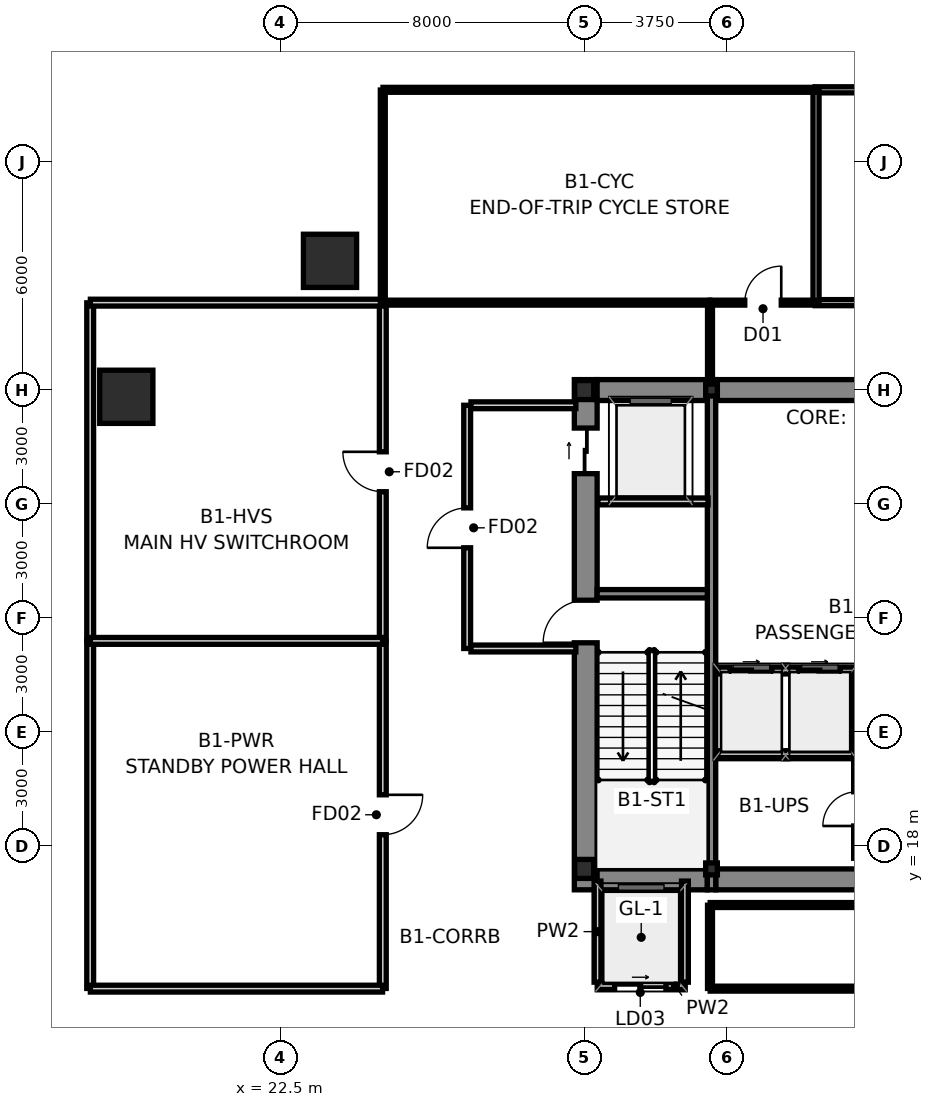
"""IFC4 building model, lengths in metres.
Left out: names, types, materials, properties, quantities, classifications, styles, units other than length and angle.
Written with IfcOpenShell. Run it as: python <this file> out.ifc"""

import sys

from ifc_helpers import new_model, si_unit, direction, frame, frame_2d, origin, origin_2d, place, context, subcontext, project, spatial, rectangle, hollow_rectangle, i_section, extrude, source, transform, mapped, element, fill, save


model = new_model("IFC4")
c1 = context("Model", 3, precision=1e-05, world=origin(), true_north=direction((0.0, 1.0)))
c2 = subcontext(c1, "Body", "Model", "MODEL_VIEW")
j1 = project(units=[si_unit("LENGTHUNIT", "METRE"), si_unit("PLANEANGLEUNIT", "RADIAN")], contexts=[c1])
p1 = place(None, origin())
s1 = spatial("IfcSite", under=j1, at=p1, CompositionType="ELEMENT")
p2 = place(p1, origin())
s2 = spatial("IfcBuilding", under=s1, at=p2, CompositionType="ELEMENT")
p3 = place(p2, frame((0.0, 0.0, -4.8)))
s3 = spatial("IfcBuildingStorey", under=s2, at=p3, CompositionType="ELEMENT", Elevation=-4.8)
m1 = source(origin(), c2, "Body", "SweptSolid", [
    extrude(i_section(OverallWidth=0.5, OverallDepth=0.5, WebThickness=0.028, FlangeThickness=0.04, at=origin_2d()), origin(), (0.0, 0.0, 1.0), 4.8),
])
for number, where, z_axis, x_axis in (
    (1, (30.5, 17.4, 0.0), (0.0, 0.0, 1.0), (1.0, 0.0, 0.0)),
    (2, (30.5, 30.0, 0.0), (0.0, 0.0, 1.0), (1.0, 0.0, 0.0)),
):
    element("IfcColumn", number, at=place(p3, frame(where, z_axis=z_axis, x_axis=x_axis)), inside=s3, PredefinedType="COLUMN", context=c2, shape_type="MappedRepresentation", body=[
        mapped(m1, transform((0.0, 0.0, 0.0), scale=1.0)),
    ])
m2 = source(origin(), c2, "Body", "SweptSolid", [
    extrude(i_section(OverallWidth=0.307, OverallDepth=0.315, WebThickness=0.012, FlangeThickness=0.019, at=origin_2d()), origin(), (0.0, 0.0, 1.0), 4.8),
])
for number, where, z_axis, x_axis in (
    (3, (33.85, 17.4, 0.0), (0.0, 0.0, 1.0), (1.0, 0.0, 0.0)),
    (4, (33.85, 30.0, 0.0), (0.0, 0.0, 1.0), (1.0, 0.0, 0.0)),
):
    element("IfcColumn", number, at=place(p3, frame(where, z_axis=z_axis, x_axis=x_axis)), inside=s3, PredefinedType="COLUMN", context=c2, shape_type="MappedRepresentation", body=[
        mapped(m2, transform((0.0, 0.0, 0.0), scale=1.0)),
    ])
p4 = place(p3, frame((30.54, 16.85, 0.0), z_axis=(0.0, 0.0, 1.0), x_axis=(0.0, 1.0, 0.0)))
e5 = element("IfcWall", 5, at=p4, inside=s3, PredefinedType="SHEAR", context=c2, shape_type="SweptSolid", body=[
    extrude(rectangle(XDim=13.425, YDim=0.6, at=frame_2d((6.712, 0.0))), origin(), (0.0, 0.0, 1.0), 4.8),
])
p5 = place(p4, frame((6.5, 0.0, 0.0)))
e6 = element("IfcOpeningElement", 6, at=p5, cuts=e5, PredefinedType="OPENING", context=c2, shape_type="SweptSolid", body=[
    extrude(rectangle(XDim=1.12, YDim=2.15, at=frame_2d((0.56, 1.075))), frame((0.0, 0.312, 0.0), z_axis=(0.0, -1.0, 0.0), x_axis=(1.0, 0.0, 0.0)), (0.0, 0.0, 1.0), 0.624),
])
p6 = place(p4, frame((10.95, 0.0, 0.0)))
e7 = element("IfcOpeningElement", 7, at=p6, cuts=e5, PredefinedType="OPENING", context=c2, shape_type="SweptSolid", body=[
    extrude(rectangle(XDim=1.2, YDim=2.2, at=frame_2d((0.6, 1.1))), frame((0.0, 0.312, 0.0), z_axis=(0.0, -1.0, 0.0), x_axis=(1.0, 0.0, 0.0)), (0.0, 0.0, 1.0), 0.624),
])
p7 = place(p3, frame((30.84, 17.125, 0.0), z_axis=(0.0, 0.0, 1.0), x_axis=(1.0, 0.0, 0.0)))
e8 = element("IfcWall", 8, at=p7, inside=s3, PredefinedType="SHEAR", context=c2, shape_type="SweptSolid", body=[
    extrude(rectangle(XDim=2.9, YDim=0.55, at=frame_2d((1.45, 0.0))), origin(), (0.0, 0.0, 1.0), 4.8),
])
p8 = place(p3, frame((33.96, 17.125, 0.0), z_axis=(0.0, 0.0, 1.0), x_axis=(1.0, 0.0, 0.0)))
e9 = element("IfcWall", 9, at=p8, inside=s3, PredefinedType="SHEAR", context=c2, shape_type="SweptSolid", body=[
    extrude(rectangle(XDim=8.08, YDim=0.55, at=frame_2d((4.04, 0.0))), origin(), (0.0, 0.0, 1.0), 4.8),
])
p9 = place(p3, frame((30.84, 30.0, 0.0), z_axis=(0.0, 0.0, 1.0), x_axis=(1.0, 0.0, 0.0)))
e10 = element("IfcWall", 10, at=p9, inside=s3, PredefinedType="SHEAR", context=c2, shape_type="SweptSolid", body=[
    extrude(rectangle(XDim=2.9, YDim=0.55, at=frame_2d((1.45, 0.0))), origin(), (0.0, 0.0, 1.0), 4.8),
])
p10 = place(p3, frame((33.96, 30.0, 0.0), z_axis=(0.0, 0.0, 1.0), x_axis=(1.0, 0.0, 0.0)))
e11 = element("IfcWall", 11, at=p10, inside=s3, PredefinedType="SHEAR", context=c2, shape_type="SweptSolid", body=[
    extrude(rectangle(XDim=3.78, YDim=0.55, at=frame_2d((1.89, 0.0))), origin(), (0.0, 0.0, 1.0), 4.8),
])
p11 = place(p3, frame((33.85, 16.85, 0.0), z_axis=(0.0, 0.0, 1.0), x_axis=(0.0, 1.0, 0.0)))
e12 = element("IfcWall", 12, at=p11, inside=s3, PredefinedType="SHEAR", context=c2, shape_type="SweptSolid", body=[
    extrude(rectangle(XDim=13.425, YDim=0.22, at=frame_2d((6.712, 0.0))), origin(), (0.0, 0.0, 1.0), 4.8),
])
p12 = place(p3, frame((30.84, 24.64, 0.0), z_axis=(0.0, 0.0, 1.0), x_axis=(1.0, 0.0, 0.0)))
e13 = element("IfcWall", 13, at=p12, inside=s3, PredefinedType="SHEAR", context=c2, shape_type="SweptSolid", body=[
    extrude(rectangle(XDim=2.9, YDim=0.22, at=frame_2d((1.45, 0.0))), origin(), (0.0, 0.0, 1.0), 4.8),
])
m3 = source(origin(), c2, "Body", "SweptSolid", [
    extrude(hollow_rectangle(XDim=1.4, YDim=1.4, WallThickness=0.08, at=origin_2d()), origin(), (0.0, 0.0, 1.0), 4.801),
])
p13 = place(p3, frame((18.451, 29.823, 0.0), z_axis=(0.014899529501, -0.013780793498, 0.999794025663), x_axis=(0.679008224545, 0.734130663438, 0.0)))
e14 = element("IfcColumn", 14, at=p13, inside=s3, PredefinedType="COLUMN", context=c2, shape_type="MappedRepresentation", body=[
    mapped(m3, transform((0.0, 0.0, 0.0), scale=1.0)),
])
m4 = source(origin(), c2, "Body", "SweptSolid", [
    extrude(hollow_rectangle(XDim=1.4, YDim=1.4, WallThickness=0.08, at=origin_2d()), origin(), (0.0, 0.0, 1.0), 4.8),
])
p14 = place(p3, frame((23.811, 33.4, 0.0), z_axis=(0.0, 0.0, 1.0), x_axis=(1.0, 0.0, 0.0)))
e15 = element("IfcColumn", 15, at=p14, inside=s3, PredefinedType="COLUMN", context=c2, shape_type="MappedRepresentation", body=[
    mapped(m4, transform((0.0, 0.0, 0.0), scale=1.0)),
])
p15 = place(p3, frame((30.85, 14.32, 0.0), z_axis=(0.0, 0.0, 1.0), x_axis=(1.0, 0.0, 0.0)))
e16 = element("IfcWall", 16, at=p15, inside=s3, PredefinedType="PARTITIONING", context=c2, shape_type="SweptSolid", body=[
    extrude(rectangle(XDim=2.3, YDim=0.18, at=frame_2d((1.15, 0.0))), origin(), (0.0, 0.0, 1.0), 4.48),
])
p16 = place(p15, frame((0.45, 0.0, 0.0)))
e17 = element("IfcOpeningElement", 17, at=p16, cuts=e16, PredefinedType="OPENING", context=c2, shape_type="SweptSolid", body=[
    extrude(rectangle(XDim=1.35, YDim=2.25, at=frame_2d((0.675, 1.125))), frame((0.0, 0.102, 0.0), z_axis=(0.0, -1.0, 0.0), x_axis=(1.0, 0.0, 0.0)), (0.0, 0.0, 1.0), 0.204),
])
p17 = place(p3, frame((30.85, 14.42, 0.0), z_axis=(0.0, 0.0, 1.0), x_axis=(0.0, 1.0, 0.0)))
e18 = element("IfcWall", 18, at=p17, inside=s3, PredefinedType="PARTITIONING", context=c2, shape_type="SweptSolid", body=[
    extrude(rectangle(XDim=2.66, YDim=0.18, at=frame_2d((1.33, 0.0))), origin(), (0.0, 0.0, 1.0), 3.854),
])
p18 = place(p3, frame((33.15, 14.42, 0.0), z_axis=(0.0, 0.0, 1.0), x_axis=(0.0, 1.0, 0.0)))
e19 = element("IfcWall", 19, at=p18, inside=s3, PredefinedType="PARTITIONING", context=c2, shape_type="SweptSolid", body=[
    extrude(rectangle(XDim=2.66, YDim=0.18, at=frame_2d((1.33, 0.0))), origin(), (0.0, 0.0, 1.0), 4.48),
])
p19 = place(p3, frame((34.02, 22.62, 0.0), z_axis=(0.0, 0.0, 1.0), x_axis=(1.0, 0.0, 0.0)))
e20 = element("IfcWall", 20, at=p19, inside=s3, PredefinedType="PARTITIONING", context=c2, shape_type="SweptSolid", body=[
    extrude(rectangle(XDim=3.6, YDim=0.18, at=frame_2d((1.8, 0.0))), origin(), (0.0, 0.0, 1.0), 4.48),
])
p20 = place(p19, frame((0.32, 0.0, 0.0)))
e21 = element("IfcOpeningElement", 21, at=p20, cuts=e20, PredefinedType="OPENING", context=c2, shape_type="SweptSolid", body=[
    extrude(rectangle(XDim=1.1, YDim=2.2, at=frame_2d((0.55, 1.1))), frame((0.0, 0.102, 0.0), z_axis=(0.0, -1.0, 0.0), x_axis=(1.0, 0.0, 0.0)), (0.0, 0.0, 1.0), 0.204),
])
p21 = place(p19, frame((2.12, 0.0, 0.0)))
e22 = element("IfcOpeningElement", 22, at=p21, cuts=e20, PredefinedType="OPENING", context=c2, shape_type="SweptSolid", body=[
    extrude(rectangle(XDim=1.1, YDim=2.2, at=frame_2d((0.55, 1.1))), frame((0.0, 0.102, 0.0), z_axis=(0.0, -1.0, 0.0), x_axis=(1.0, 0.0, 0.0)), (0.0, 0.0, 1.0), 0.204),
])
p22 = place(p3, frame((37.62, 20.52, 0.0), z_axis=(0.0, 0.0, 1.0), x_axis=(0.0, 1.0, 0.0)))
e23 = element("IfcWall", 23, at=p22, inside=s3, PredefinedType="PARTITIONING", context=c2, shape_type="SweptSolid", body=[
    extrude(rectangle(XDim=2.0, YDim=0.18, at=frame_2d((1.0, 0.0))), origin(), (0.0, 0.0, 1.0), 4.48),
])
p23 = place(p3, frame((27.42, 23.2, 0.0), z_axis=(0.0, 0.0, 1.0), x_axis=(0.0, 1.0, 0.0)))
e24 = element("IfcWall", 24, at=p23, inside=s3, PredefinedType="PARTITIONING", context=c2, shape_type="SweptSolid", body=[
    extrude(rectangle(XDim=6.4, YDim=0.18, at=frame_2d((3.2, 0.0))), origin(), (0.0, 0.0, 1.0), 4.106),
])
p24 = place(p23, frame((2.65, 0.0, 0.0)))
e25 = element("IfcOpeningElement", 25, at=p24, cuts=e24, PredefinedType="OPENING", context=c2, shape_type="SweptSolid", body=[
    extrude(rectangle(XDim=1.05, YDim=2.15, at=frame_2d((0.525, 1.075))), frame((0.0, 0.102, 0.0), z_axis=(0.0, -1.0, 0.0), x_axis=(1.0, 0.0, 0.0)), (0.0, 0.0, 1.0), 0.204),
])
p25 = place(p3, frame((27.52, 23.2, 0.0), z_axis=(0.0, 0.0, 1.0), x_axis=(1.0, 0.0, 0.0)))
e26 = element("IfcWall", 26, at=p25, inside=s3, PredefinedType="PARTITIONING", context=c2, shape_type="SweptSolid", body=[
    extrude(rectangle(XDim=2.76, YDim=0.18, at=frame_2d((1.38, 0.0))), origin(), (0.0, 0.0, 1.0), 4.48),
])
p26 = place(p3, frame((27.52, 29.6, 0.0), z_axis=(0.0, 0.0, 1.0), x_axis=(1.0, 0.0, 0.0)))
e27 = element("IfcWall", 27, at=p26, inside=s3, PredefinedType="PARTITIONING", context=c2, shape_type="SweptSolid", body=[
    extrude(rectangle(XDim=2.76, YDim=0.18, at=frame_2d((1.38, 0.0))), origin(), (0.0, 0.0, 1.0), 3.854),
])
p27 = place(p3, frame((30.86, 27.07, 0.0), z_axis=(0.0, 0.0, 1.0), x_axis=(1.0, 0.0, 0.0)))
e28 = element("IfcWall", 28, at=p27, inside=s3, PredefinedType="PARTITIONING", context=c2, shape_type="SweptSolid", body=[
    extrude(rectangle(XDim=2.9, YDim=0.18, at=frame_2d((1.45, 0.0))), origin(), (0.0, 0.0, 1.0), 4.48),
])
p28 = place(p3, frame((34.02, 20.42, 0.0), z_axis=(0.0, 0.0, 1.0), x_axis=(1.0, 0.0, 0.0)))
e29 = element("IfcWall", 29, at=p28, inside=s3, PredefinedType="PARTITIONING", context=c2, shape_type="SweptSolid", body=[
    extrude(rectangle(XDim=3.64, YDim=0.18, at=frame_2d((1.82, 0.0))), origin(), (0.0, 0.0, 1.0), 4.48),
])
p29 = place(p3, frame((37.68, 17.68, 0.0), z_axis=(0.0, 0.0, 1.0), x_axis=(0.0, 1.0, 0.0)))
e30 = element("IfcWall", 30, at=p29, inside=s3, PredefinedType="PARTITIONING", context=c2, shape_type="SweptSolid", body=[
    extrude(rectangle(XDim=2.7, YDim=0.18, at=frame_2d((1.35, 0.0))), origin(), (0.0, 0.0, 1.0), 4.48),
])
p30 = place(p29, frame((0.85, 0.0, 0.0)))
e31 = element("IfcOpeningElement", 31, at=p30, cuts=e30, PredefinedType="OPENING", context=c2, shape_type="SweptSolid", body=[
    extrude(rectangle(XDim=0.9, YDim=2.1, at=frame_2d((0.45, 1.05))), frame((0.0, 0.102, 0.0), z_axis=(0.0, -1.0, 0.0), x_axis=(1.0, 0.0, 0.0)), (0.0, 0.0, 1.0), 0.204),
])
p31 = place(p3, frame((36.575, 32.3, 0.0), z_axis=(0.0, 0.0, 1.0), x_axis=(1.0, 0.0, 0.0)))
e32 = element("IfcWall", 32, at=p31, inside=s3, PredefinedType="PLUMBINGWALL", context=c2, shape_type="SweptSolid", body=[
    extrude(rectangle(XDim=7.85, YDim=0.16, at=frame_2d((3.925, 0.0))), origin(), (0.0, 0.0, 1.0), 4.48),
])
p32 = place(p31, frame((3.435, 0.0, 0.0)))
e33 = element("IfcOpeningElement", 33, at=p32, cuts=e32, PredefinedType="OPENING", context=c2, shape_type="SweptSolid", body=[
    extrude(rectangle(XDim=0.92, YDim=2.1, at=frame_2d((0.46, 1.05))), frame((0.0, 0.092, 0.0), z_axis=(0.0, -1.0, 0.0), x_axis=(1.0, 0.0, 0.0)), (0.0, 0.0, 1.0), 0.184),
])
p33 = place(p3, frame((36.575, 37.9, 0.0), z_axis=(0.0, 0.0, 1.0), x_axis=(1.0, 0.0, 0.0)))
e34 = element("IfcWall", 34, at=p33, inside=s3, PredefinedType="PLUMBINGWALL", context=c2, shape_type="SweptSolid", body=[
    extrude(rectangle(XDim=7.85, YDim=0.16, at=frame_2d((3.925, 0.0))), origin(), (0.0, 0.0, 1.0), 4.48),
])
p34 = place(p3, frame((36.6, 32.275, 0.0), z_axis=(0.0, 0.0, 1.0), x_axis=(0.0, 1.0, 0.0)))
e35 = element("IfcWall", 35, at=p34, inside=s3, PredefinedType="PLUMBINGWALL", context=c2, shape_type="SweptSolid", body=[
    extrude(rectangle(XDim=5.65, YDim=0.16, at=frame_2d((2.825, 0.0))), origin(), (0.0, 0.0, 1.0), 4.48),
])
p35 = place(p3, frame((25.2, 23.395, 0.0), z_axis=(0.0, 0.0, 1.0), x_axis=(0.0, -1.0, 0.0)))
e36 = element("IfcWall", 36, at=p35, inside=s3, PredefinedType="PARTITIONING", context=c2, shape_type="SweptSolid", body=[
    extrude(rectangle(XDim=9.14, YDim=0.18, at=frame_2d((4.57, 0.0))), origin(), (0.0, 0.0, 1.0), 4.48),
])
p36 = place(p35, frame((4.045, 0.0, 0.0)))
e37 = element("IfcOpeningElement", 37, at=p36, cuts=e36, PredefinedType="OPENING", context=c2, shape_type="SweptSolid", body=[
    extrude(rectangle(XDim=1.05, YDim=2.15, at=frame_2d((0.525, 1.075))), frame((0.0, 0.102, 0.0), z_axis=(0.0, -1.0, 0.0), x_axis=(1.0, 0.0, 0.0)), (0.0, 0.0, 1.0), 0.204),
])
p37 = place(p3, frame((17.5, 14.255, 0.0), z_axis=(0.0, 0.0, 1.0), x_axis=(0.0, 1.0, 0.0)))
e38 = element("IfcWall", 38, at=p37, inside=s3, PredefinedType="PARTITIONING", context=c2, shape_type="SweptSolid", body=[
    extrude(rectangle(XDim=9.14, YDim=0.18, at=frame_2d((4.57, 0.0))), origin(), (0.0, 0.0, 1.0), 4.106),
])
p38 = place(p3, frame((17.5, 23.405, 0.0), z_axis=(0.0, 0.0, 1.0), x_axis=(0.0, 1.0, 0.0)))
e39 = element("IfcWall", 39, at=p38, inside=s3, PredefinedType="PARTITIONING", context=c2, shape_type="SweptSolid", body=[
    extrude(rectangle(XDim=8.89, YDim=0.18, at=frame_2d((4.445, 0.0))), origin(), (0.0, 0.0, 1.0), 4.48),
])
p39 = place(p3, frame((25.2, 23.405, 0.0), z_axis=(0.0, 0.0, 1.0), x_axis=(0.0, 1.0, 0.0)))
e40 = element("IfcWall", 40, at=p39, inside=s3, PredefinedType="PARTITIONING", context=c2, shape_type="SweptSolid", body=[
    extrude(rectangle(XDim=8.89, YDim=0.18, at=frame_2d((4.445, 0.0))), origin(), (0.0, 0.0, 1.0), 4.106),
])
p40 = place(p39, frame((3.92, 0.0, 0.0)))
e41 = element("IfcOpeningElement", 41, at=p40, cuts=e40, PredefinedType="OPENING", context=c2, shape_type="SweptSolid", body=[
    extrude(rectangle(XDim=1.05, YDim=2.15, at=frame_2d((0.525, 1.075))), frame((0.0, 0.102, 0.0), z_axis=(0.0, -1.0, 0.0), x_axis=(1.0, 0.0, 0.0)), (0.0, 0.0, 1.0), 0.204),
])
for number, where, z_axis, x_axis in (
    (42, (25.195, 14.25, 0.0), (0.0, 0.0, 1.0), (-1.0, 0.0, 0.0)),
    (43, (17.505, 23.4, 0.0), (0.0, 0.0, 1.0), (1.0, 0.0, 0.0)),
    (44, (17.505, 32.3, 0.0), (0.0, 0.0, 1.0), (1.0, 0.0, 0.0)),
):
    element("IfcWall", number, at=place(p3, frame(where, z_axis=z_axis, x_axis=x_axis)), inside=s3, PredefinedType="PARTITIONING", context=c2, shape_type="SweptSolid", body=[
        extrude(rectangle(XDim=7.69, YDim=0.18, at=frame_2d((3.845, 0.0))), origin(), (0.0, 0.0, 1.0), 4.48),
    ])
p41 = place(p3, frame((33.815, 14.25, 0.0), z_axis=(0.0, 0.0, 1.0), x_axis=(1.0, 0.0, 0.0)))
e45 = element("IfcWall", 45, at=p41, inside=s3, PredefinedType="PARTITIONING", context=c2, shape_type="SweptSolid", body=[
    extrude(rectangle(XDim=16.98, YDim=0.13, at=frame_2d((8.49, 0.0))), origin(), (0.0, 0.0, 1.0), 4.48),
])
p42 = place(p3, frame((48.58, 16.45, 0.0), z_axis=(0.0, 0.0, 1.0), x_axis=(-1.0, 0.0, 0.0)))
e46 = element("IfcWall", 46, at=p42, inside=s3, PredefinedType="PARTITIONING", context=c2, shape_type="SweptSolid", body=[
    extrude(rectangle(XDim=14.765, YDim=0.13, at=frame_2d((7.383, 0.0))), origin(), (0.0, 0.0, 1.0), 4.48),
])
p43 = place(p3, frame((25.205, 37.9, 0.0), z_axis=(0.0, 0.0, 1.0), x_axis=(1.0, 0.0, 0.0)))
e47 = element("IfcWall", 47, at=p43, inside=s3, PredefinedType="PARTITIONING", context=c2, shape_type="SweptSolid", body=[
    extrude(rectangle(XDim=11.39, YDim=0.13, at=frame_2d((5.695, 0.0))), origin(), (0.0, 0.0, 1.0), 4.48),
])
p44 = place(p3, frame((25.205, 32.3, 0.0), z_axis=(0.0, 0.0, 1.0), x_axis=(1.0, 0.0, 0.0)))
e48 = element("IfcWall", 48, at=p44, inside=s3, PredefinedType="PARTITIONING", context=c2, shape_type="SweptSolid", body=[
    extrude(rectangle(XDim=8.6, YDim=0.13, at=frame_2d((4.3, 0.0))), origin(), (0.0, 0.0, 1.0), 4.48),
])
p45 = place(p3, frame((25.2, 32.305, 0.0), z_axis=(0.0, 0.0, 1.0), x_axis=(0.0, 1.0, 0.0)))
e49 = element("IfcWall", 49, at=p45, inside=s3, PredefinedType="PARTITIONING", context=c2, shape_type="SweptSolid", body=[
    extrude(rectangle(XDim=5.59, YDim=0.13, at=frame_2d((2.795, 0.0))), origin(), (0.0, 0.0, 1.0), 4.48),
])
p46 = place(p3, frame((33.815, 32.3, 0.0), z_axis=(0.0, 0.0, 1.0), x_axis=(1.0, 0.0, 0.0)))
e50 = element("IfcWall", 50, at=p46, inside=s3, PredefinedType="PARTITIONING", context=c2, shape_type="SweptSolid", body=[
    extrude(rectangle(XDim=2.78, YDim=0.13, at=frame_2d((1.39, 0.0))), origin(), (0.0, 0.0, 1.0), 4.48),
])
p47 = place(p46, frame((0.91, 0.0, 0.0)))
e51 = element("IfcOpeningElement", 51, at=p47, cuts=e50, PredefinedType="OPENING", context=c2, shape_type="SweptSolid", body=[
    extrude(rectangle(XDim=0.96, YDim=2.15, at=frame_2d((0.48, 1.075))), frame((0.0, 0.077, 0.0), z_axis=(0.0, -1.0, 0.0), x_axis=(1.0, 0.0, 0.0)), (0.0, 0.0, 1.0), 0.154),
])
p48 = place(p3, frame((33.81, 16.445, 0.0), z_axis=(0.0, 0.0, 1.0), x_axis=(0.0, -1.0, 0.0)))
e52 = element("IfcWall", 52, at=p48, inside=s3, PredefinedType="PARTITIONING", context=c2, shape_type="SweptSolid", body=[
    extrude(rectangle(XDim=2.19, YDim=0.13, at=frame_2d((1.095, 0.0))), origin(), (0.0, 0.0, 1.0), 4.48),
])
p49 = place(p3, frame((33.81, 32.295, 0.0), z_axis=(0.0, 0.0, 1.0), x_axis=(0.0, -1.0, 0.0)))
e53 = element("IfcWall", 53, at=p49, inside=s3, PredefinedType="PARTITIONING", context=c2, shape_type="SweptSolid", body=[
    extrude(rectangle(XDim=2.12, YDim=0.13, at=frame_2d((1.06, 0.0))), origin(), (0.0, 0.0, 1.0), 4.48),
])
p50 = place(p5, origin())
e54 = element("IfcDoor", 54, at=p50, inside=s3, OperationType="SINGLE_SWING_LEFT", PredefinedType="DOOR", context=c2, shape_type="SweptSolid", body=[
    extrude(rectangle(XDim=1.12, YDim=2.15, at=frame_2d((0.56, 1.075))), frame((0.0, 0.025, 0.0), z_axis=(0.0, -1.0, 0.0), x_axis=(1.0, 0.0, 0.0)), (0.0, 0.0, 1.0), 0.05),
])
fill(e6, e54)
p51 = place(p6, origin())
e55 = element("IfcDoor", 55, at=p51, inside=s3, OperationType="SLIDING_TO_LEFT", PredefinedType="DOOR", context=c2, shape_type="SweptSolid", body=[
    extrude(rectangle(XDim=1.2, YDim=2.2, at=frame_2d((0.6, 1.1))), frame((0.0, 0.025, 0.0), z_axis=(0.0, -1.0, 0.0), x_axis=(1.0, 0.0, 0.0)), (0.0, 0.0, 1.0), 0.05),
])
fill(e7, e55)
p52 = place(p16, origin())
e56 = element("IfcDoor", 56, at=p52, inside=s3, OperationType="SLIDING_TO_LEFT", PredefinedType="DOOR", context=c2, shape_type="SweptSolid", body=[
    extrude(rectangle(XDim=1.35, YDim=2.25, at=frame_2d((0.675, 1.125))), frame((0.0, 0.025, 0.0), z_axis=(0.0, -1.0, 0.0), x_axis=(1.0, 0.0, 0.0)), (0.0, 0.0, 1.0), 0.05),
])
fill(e17, e56)
p53 = place(p20, origin())
e57 = element("IfcDoor", 57, at=p53, inside=s3, OperationType="SLIDING_TO_LEFT", PredefinedType="DOOR", context=c2, shape_type="SweptSolid", body=[
    extrude(rectangle(XDim=1.1, YDim=2.2, at=frame_2d((0.55, 1.1))), frame((0.0, 0.025, 0.0), z_axis=(0.0, -1.0, 0.0), x_axis=(1.0, 0.0, 0.0)), (0.0, 0.0, 1.0), 0.05),
])
fill(e21, e57)
p54 = place(p21, origin())
e58 = element("IfcDoor", 58, at=p54, inside=s3, OperationType="SLIDING_TO_RIGHT", PredefinedType="DOOR", context=c2, shape_type="SweptSolid", body=[
    extrude(rectangle(XDim=1.1, YDim=2.2, at=frame_2d((0.55, 1.1))), frame((0.0, 0.025, 0.0), z_axis=(0.0, -1.0, 0.0), x_axis=(1.0, 0.0, 0.0)), (0.0, 0.0, 1.0), 0.05),
])
fill(e22, e58)
p55 = place(p24, origin())
e59 = element("IfcDoor", 59, at=p55, inside=s3, OperationType="SINGLE_SWING_LEFT", PredefinedType="DOOR", context=c2, shape_type="SweptSolid", body=[
    extrude(rectangle(XDim=1.05, YDim=2.15, at=frame_2d((0.525, 1.075))), frame((0.0, 0.025, 0.0), z_axis=(0.0, -1.0, 0.0), x_axis=(1.0, 0.0, 0.0)), (0.0, 0.0, 1.0), 0.05),
])
fill(e25, e59)
p56 = place(p47, origin())
e60 = element("IfcDoor", 60, at=p56, inside=s3, OperationType="SINGLE_SWING_RIGHT", PredefinedType="DOOR", context=c2, shape_type="SweptSolid", body=[
    extrude(rectangle(XDim=0.96, YDim=2.15, at=frame_2d((0.48, 1.075))), frame((0.0, 0.025, 0.0), z_axis=(0.0, -1.0, 0.0), x_axis=(1.0, 0.0, 0.0)), (0.0, 0.0, 1.0), 0.05),
])
fill(e51, e60)
p57 = place(p36, origin())
e61 = element("IfcDoor", 61, at=p57, inside=s3, OperationType="SINGLE_SWING_LEFT", PredefinedType="DOOR", context=c2, shape_type="SweptSolid", body=[
    extrude(rectangle(XDim=1.05, YDim=2.15, at=frame_2d((0.525, 1.075))), frame((0.0, 0.025, 0.0), z_axis=(0.0, -1.0, 0.0), x_axis=(1.0, 0.0, 0.0)), (0.0, 0.0, 1.0), 0.05),
])
fill(e37, e61)
p58 = place(p40, origin())
e62 = element("IfcDoor", 62, at=p58, inside=s3, OperationType="SINGLE_SWING_RIGHT", PredefinedType="DOOR", context=c2, shape_type="SweptSolid", body=[
    extrude(rectangle(XDim=1.05, YDim=2.15, at=frame_2d((0.525, 1.075))), frame((0.0, 0.025, 0.0), z_axis=(0.0, -1.0, 0.0), x_axis=(1.0, 0.0, 0.0)), (0.0, 0.0, 1.0), 0.05),
])
fill(e41, e62)
save(model, sys.argv[1])
